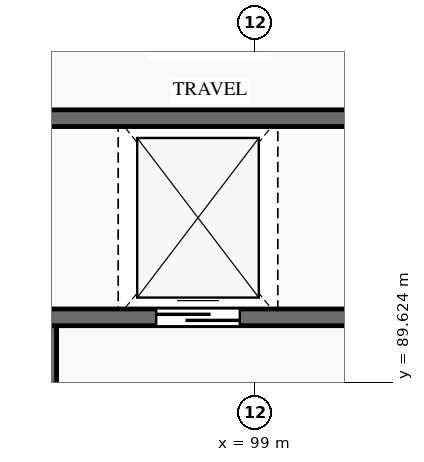
"""IFC4 building model, lengths in metres.
Left out: names, types, materials, properties, quantities, classifications, styles, units other than length and angle.
Written with IfcOpenShell. Run it as: python <this file> out.ifc"""

import sys

from ifc_helpers import new_model, si_unit, direction, frame, frame_2d, origin, place, context, subcontext, project, spatial, rectangle, extrude, element, fill, save


model = new_model("IFC4")
c1 = context("Model", 3, precision=1e-05, world=origin(), true_north=direction((0.0, 1.0)))
c2 = subcontext(c1, "Body", "Model", "MODEL_VIEW")
j1 = project(units=[si_unit("LENGTHUNIT", "METRE"), si_unit("PLANEANGLEUNIT", "RADIAN")], contexts=[c1])
p1 = place(None, origin())
s1 = spatial("IfcSite", under=j1, at=p1, CompositionType="ELEMENT")
p2 = place(p1, origin())
s2 = spatial("IfcBuilding", under=s1, at=p2, CompositionType="ELEMENT")
p3 = place(p2, origin())
s3 = spatial("IfcBuildingStorey", under=s2, at=p3, CompositionType="ELEMENT", Elevation=0.0)
p4 = place(p3, frame((96.27, 86.4, 0.0), z_axis=(0.0, 0.0, 1.0), x_axis=(0.0, 1.0, 0.0)))
e1 = element("IfcWall", 1, at=p4, inside=s3, PredefinedType="SHEAR", context=c2, shape_type="SweptSolid", body=[
    extrude(rectangle(XDim=4.0, YDim=0.24, at=frame_2d((2.0, 0.0))), origin(), (0.0, 0.0, 1.0), 6.0),
])
p5 = place(p4, frame((1.3, 0.0, 0.0)))
e2 = element("IfcOpeningElement", 2, at=p5, cuts=e1, PredefinedType="OPENING", context=c2, shape_type="SweptSolid", body=[
    extrude(rectangle(XDim=1.4, YDim=2.2, at=frame_2d((0.7, 1.1))), frame((0.0, 0.135, 0.0), z_axis=(0.0, -1.0, 0.0), x_axis=(1.0, 0.0, 0.0)), (0.0, 0.0, 1.0), 0.27),
])
p6 = place(p3, frame((96.17, 90.48, 0.0), z_axis=(0.0, 0.0, 1.0), x_axis=(1.0, 0.0, 0.0)))
e3 = element("IfcWall", 3, at=p6, inside=s3, PredefinedType="SHEAR", context=c2, shape_type="SweptSolid", body=[
    extrude(rectangle(XDim=4.16, YDim=0.22, at=frame_2d((2.08, 0.0))), origin(), (0.0, 0.0, 1.0), 6.0),
])
p7 = place(p6, frame((1.53, 0.0, 0.0)))
e4 = element("IfcOpeningElement", 4, at=p7, cuts=e3, PredefinedType="OPENING", context=c2, shape_type="SweptSolid", body=[
    extrude(rectangle(XDim=1.1, YDim=2.15, at=frame_2d((0.55, 1.075))), frame((0.0, 0.125, 0.0), z_axis=(0.0, -1.0, 0.0), x_axis=(1.0, 0.0, 0.0)), (0.0, 0.0, 1.0), 0.25),
])
p8 = place(p3, frame((96.17, 93.1, 0.0), z_axis=(0.0, 0.0, 1.0), x_axis=(1.0, 0.0, 0.0)))
e5 = element("IfcWall", 5, at=p8, inside=s3, PredefinedType="SHEAR", context=c2, shape_type="SweptSolid", body=[
    extrude(rectangle(XDim=4.16, YDim=0.22, at=frame_2d((2.08, 0.0))), origin(), (0.0, 0.0, 1.0), 6.0),
])
p9 = place(p7, origin())
e6 = element("IfcDoor", 6, at=p9, inside=s3, OperationType="SLIDING_TO_RIGHT", PredefinedType="DOOR", context=c2, shape_type="SweptSolid", body=[
    extrude(rectangle(XDim=1.1, YDim=2.15, at=frame_2d((0.55, 1.075))), frame((0.0, 0.025, 0.0), z_axis=(0.0, -1.0, 0.0), x_axis=(1.0, 0.0, 0.0)), (0.0, 0.0, 1.0), 0.05),
])
fill(e4, e6)
save(model, sys.argv[1])
